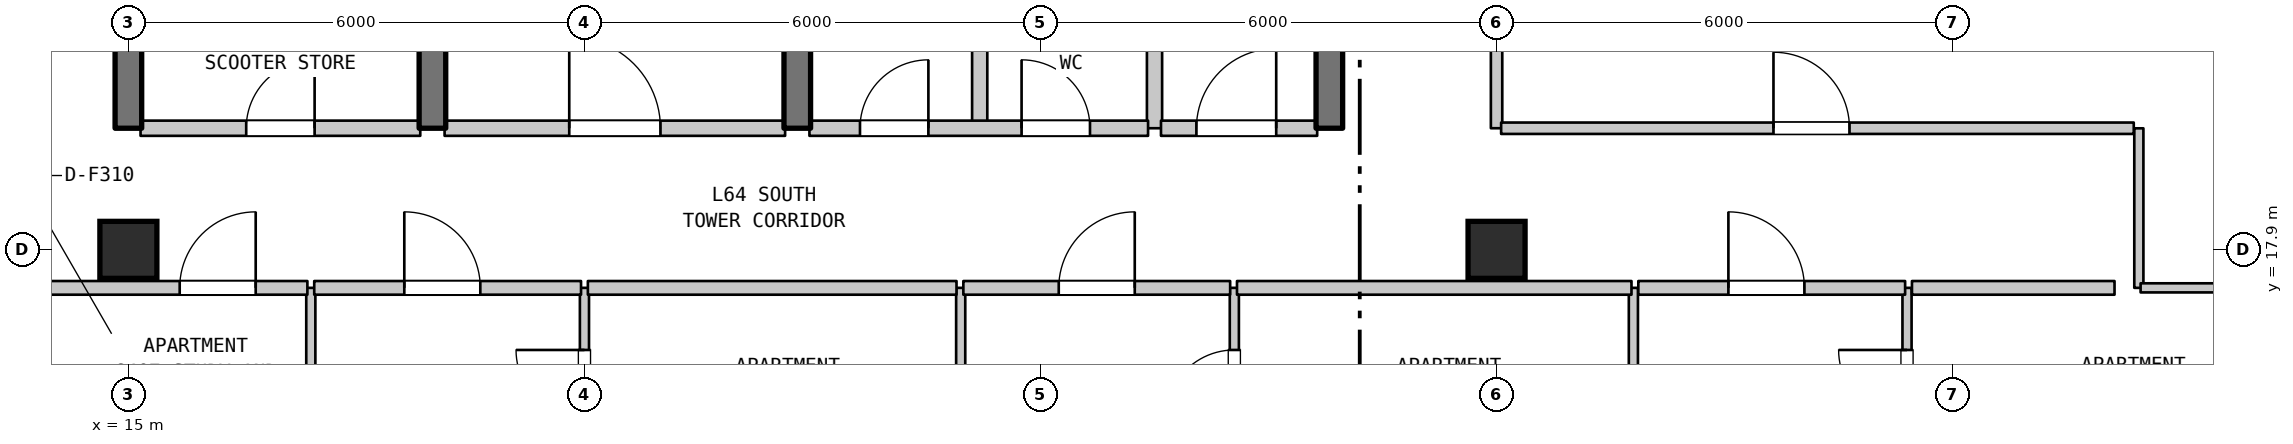
"""IFC4 building model, lengths in metres.
Left out: names, types, materials, properties, quantities, classifications, styles, units other than length and angle.
Written with IfcOpenShell. Run it as: python <this file> out.ifc"""

import sys

from ifc_helpers import new_model, si_unit, direction, frame, frame_2d, origin, origin_2d, place, context, subcontext, project, spatial, rectangle, extrude, element, fill, save


model = new_model("IFC4")
c1 = context("Model", 3, precision=1e-05, world=origin(), true_north=direction((0.0, 1.0)))
c2 = subcontext(c1, "Body", "Model", "MODEL_VIEW")
j1 = project(units=[si_unit("LENGTHUNIT", "METRE"), si_unit("PLANEANGLEUNIT", "RADIAN")], contexts=[c1])
p1 = place(None, origin())
s1 = spatial("IfcSite", under=j1, at=p1, CompositionType="ELEMENT")
p2 = place(p1, origin())
s2 = spatial("IfcBuilding", under=s1, at=p2, CompositionType="ELEMENT")
p3 = place(p2, frame((0.0, 0.0, 258.4)))
s3 = spatial("IfcBuildingStorey", under=s2, at=p3, CompositionType="ELEMENT", Elevation=258.4)
for number, where, z_axis, x_axis in (
    (1, (15.0, 17.9, 0.0), (0.0, 0.0, 1.0), (1.0, 0.0, 0.0)),
    (2, (33.0, 17.9, 0.0), (0.0, 0.0, 1.0), (1.0, 0.0, 0.0)),
):
    element("IfcColumn", number, at=place(p3, frame(where, z_axis=z_axis, x_axis=x_axis)), inside=s3, PredefinedType="COLUMN", context=c2, shape_type="SweptSolid", body=[
        extrude(rectangle(XDim=0.75, YDim=0.75, at=origin_2d()), origin(), (0.0, 0.0, 1.0), 3.7),
    ])
p4 = place(p3, frame((15.0, 19.5, 0.0), z_axis=(0.0, 0.0, 1.0), x_axis=(0.0, 1.0, 0.0)))
e3 = element("IfcWall", 3, at=p4, inside=s3, PredefinedType="SHEAR", context=c2, shape_type="SweptSolid", body=[
    extrude(rectangle(XDim=3.2, YDim=0.35, at=frame_2d((1.6, 0.0))), origin(), (0.0, 0.0, 1.0), 3.39),
])
p5 = place(p3, frame((17.4, 9.91, 0.0), z_axis=(0.0, 0.0, 1.0), x_axis=(0.0, 1.0, 0.0)))
e4 = element("IfcWall", 4, at=p5, inside=s3, PredefinedType="PARTITIONING", context=c2, shape_type="SweptSolid", body=[
    extrude(rectangle(XDim=7.49, YDim=0.12, at=frame_2d((3.745, 0.0))), origin(), (0.0, 0.0, 1.0), 3.39),
])
p6 = place(p3, frame((19.0, 19.5, 0.0), z_axis=(0.0, 0.0, 1.0), x_axis=(0.0, 1.0, 0.0)))
e5 = element("IfcWall", 5, at=p6, inside=s3, PredefinedType="SHEAR", context=c2, shape_type="SweptSolid", body=[
    extrude(rectangle(XDim=3.2, YDim=0.35, at=frame_2d((1.6, 0.0))), origin(), (0.0, 0.0, 1.0), 3.39),
])
p7 = place(p3, frame((21.0, 15.008, 0.0), z_axis=(0.0, 0.0, 1.0), x_axis=(0.0, 1.0, 0.0)))
e6 = element("IfcWall", 6, at=p7, inside=s3, PredefinedType="PARTITIONING", context=c2, shape_type="SweptSolid", body=[
    extrude(rectangle(XDim=2.392, YDim=0.12, at=frame_2d((1.196, 0.0))), origin(), (0.0, 0.0, 1.0), 3.39),
])
p8 = place(p7, frame((0.675, 0.0, 0.0)))
e7 = element("IfcOpeningElement", 7, at=p8, cuts=e6, PredefinedType="OPENING", context=c2, shape_type="SweptSolid", body=[
    extrude(rectangle(XDim=0.9, YDim=2.1, at=frame_2d((0.45, 1.05))), frame((0.0, 0.07, 0.0), z_axis=(0.0, -1.0, 0.0), x_axis=(1.0, 0.0, 0.0)), (0.0, 0.0, 1.0), 0.14),
])
p9 = place(p3, frame((23.8, 19.5, 0.0), z_axis=(0.0, 0.0, 1.0), x_axis=(0.0, 1.0, 0.0)))
e8 = element("IfcWall", 8, at=p9, inside=s3, PredefinedType="SHEAR", context=c2, shape_type="SweptSolid", body=[
    extrude(rectangle(XDim=3.2, YDim=0.35, at=frame_2d((1.6, 0.0))), origin(), (0.0, 0.0, 1.0), 3.39),
])
p10 = place(p3, frame((25.95, 15.008, 0.0), z_axis=(0.0, 0.0, 1.0), x_axis=(0.0, 1.0, 0.0)))
e9 = element("IfcWall", 9, at=p10, inside=s3, PredefinedType="PARTITIONING", context=c2, shape_type="SweptSolid", body=[
    extrude(rectangle(XDim=2.392, YDim=0.12, at=frame_2d((1.196, 0.0))), origin(), (0.0, 0.0, 1.0), 3.39),
])
for number, where, z_axis, x_axis in (
    (10, (26.2, 19.5, 0.0), (0.0, 0.0, 1.0), (0.0, 1.0, 0.0)),
    (11, (28.5, 19.5, 0.0), (0.0, 0.0, 1.0), (0.0, 1.0, 0.0)),
):
    element("IfcWall", number, at=place(p3, frame(where, z_axis=z_axis, x_axis=x_axis)), inside=s3, PredefinedType="STANDARD", context=c2, shape_type="SweptSolid", body=[
        extrude(rectangle(XDim=3.2, YDim=0.2, at=frame_2d((1.6, 0.0))), origin(), (0.0, 0.0, 1.0), 3.39),
    ])
p11 = place(p3, frame((29.55, 15.008, 0.0), z_axis=(0.0, 0.0, 1.0), x_axis=(0.0, 1.0, 0.0)))
e12 = element("IfcWall", 12, at=p11, inside=s3, PredefinedType="PARTITIONING", context=c2, shape_type="SweptSolid", body=[
    extrude(rectangle(XDim=2.392, YDim=0.12, at=frame_2d((1.196, 0.0))), origin(), (0.0, 0.0, 1.0), 3.39),
])
p12 = place(p11, frame((0.675, 0.0, 0.0)))
e13 = element("IfcOpeningElement", 13, at=p12, cuts=e12, PredefinedType="OPENING", context=c2, shape_type="SweptSolid", body=[
    extrude(rectangle(XDim=0.9, YDim=2.1, at=frame_2d((0.45, 1.05))), frame((0.0, 0.07, 0.0), z_axis=(0.0, -1.0, 0.0), x_axis=(1.0, 0.0, 0.0)), (0.0, 0.0, 1.0), 0.14),
])
p13 = place(p3, frame((30.8, 19.5, 0.0), z_axis=(0.0, 0.0, 1.0), x_axis=(0.0, 1.0, 0.0)))
e14 = element("IfcWall", 14, at=p13, inside=s3, PredefinedType="SHEAR", context=c2, shape_type="SweptSolid", body=[
    extrude(rectangle(XDim=3.2, YDim=0.35, at=frame_2d((1.6, 0.0))), origin(), (0.0, 0.0, 1.0), 3.39),
])
p14 = place(p3, frame((33.0, 19.5, 0.0), z_axis=(0.0, 0.0, 1.0), x_axis=(0.0, 1.0, 0.0)))
e15 = element("IfcWall", 15, at=p14, inside=s3, PredefinedType="STANDARD", context=c2, shape_type="SweptSolid", body=[
    extrude(rectangle(XDim=8.4, YDim=0.15, at=frame_2d((4.2, 0.0))), origin(), (0.0, 0.0, 1.0), 3.1),
])
p15 = place(p14, frame((4.48, 0.0, 0.0)))
e16 = element("IfcOpeningElement", 16, at=p15, cuts=e15, PredefinedType="OPENING", context=c2, shape_type="SweptSolid", body=[
    extrude(rectangle(XDim=1.0, YDim=2.15, at=frame_2d((0.5, 1.075))), frame((0.0, 0.085, 0.0), z_axis=(0.0, -1.0, 0.0), x_axis=(1.0, 0.0, 0.0)), (0.0, 0.0, 1.0), 0.17),
])
p16 = place(p3, frame((34.8, 15.008, 0.0), z_axis=(0.0, 0.0, 1.0), x_axis=(0.0, 1.0, 0.0)))
e17 = element("IfcWall", 17, at=p16, inside=s3, PredefinedType="PARTITIONING", context=c2, shape_type="SweptSolid", body=[
    extrude(rectangle(XDim=2.392, YDim=0.12, at=frame_2d((1.196, 0.0))), origin(), (0.0, 0.0, 1.0), 3.39),
])
p17 = place(p3, frame((38.4, 15.008, 0.0), z_axis=(0.0, 0.0, 1.0), x_axis=(0.0, 1.0, 0.0)))
e18 = element("IfcWall", 18, at=p17, inside=s3, PredefinedType="PARTITIONING", context=c2, shape_type="SweptSolid", body=[
    extrude(rectangle(XDim=2.392, YDim=0.12, at=frame_2d((1.196, 0.0))), origin(), (0.0, 0.0, 1.0), 3.39),
])
p18 = place(p17, frame((0.675, 0.0, 0.0)))
e19 = element("IfcOpeningElement", 19, at=p18, cuts=e18, PredefinedType="OPENING", context=c2, shape_type="SweptSolid", body=[
    extrude(rectangle(XDim=0.9, YDim=2.1, at=frame_2d((0.45, 1.05))), frame((0.0, 0.07, 0.0), z_axis=(0.0, -1.0, 0.0), x_axis=(1.0, 0.0, 0.0)), (0.0, 0.0, 1.0), 0.14),
])
p19 = place(p3, frame((41.45, 17.4, 0.0), z_axis=(0.0, 0.0, 1.0), x_axis=(0.0, 1.0, 0.0)))
e20 = element("IfcWall", 20, at=p19, inside=s3, PredefinedType="PARTITIONING", context=c2, shape_type="SweptSolid", body=[
    extrude(rectangle(XDim=2.099, YDim=0.12, at=frame_2d((1.05, 0.0))), origin(), (0.0, 0.0, 1.0), 3.39),
])
p20 = place(p3, frame((13.665, 17.4, 0.0), z_axis=(0.0, 0.0, 1.0), x_axis=(1.0, 0.0, 0.0)))
e21 = element("IfcWall", 21, at=p20, inside=s3, PredefinedType="STANDARD", context=c2, shape_type="SweptSolid", body=[
    extrude(rectangle(XDim=3.69, YDim=0.18, at=frame_2d((1.845, 0.0))), origin(), (0.0, 0.0, 1.0), 3.39),
])
p21 = place(p20, frame((2.01, 0.0, 0.0)))
e22 = element("IfcOpeningElement", 22, at=p21, cuts=e21, PredefinedType="OPENING", context=c2, shape_type="SweptSolid", body=[
    extrude(rectangle(XDim=1.0, YDim=2.15, at=frame_2d((0.5, 1.075))), frame((0.0, 0.1, 0.0), z_axis=(0.0, -1.0, 0.0), x_axis=(1.0, 0.0, 0.0)), (0.0, 0.0, 1.0), 0.2),
])
p22 = place(p3, frame((17.445, 17.4, 0.0), z_axis=(0.0, 0.0, 1.0), x_axis=(1.0, 0.0, 0.0)))
e23 = element("IfcWall", 23, at=p22, inside=s3, PredefinedType="STANDARD", context=c2, shape_type="SweptSolid", body=[
    extrude(rectangle(XDim=3.51, YDim=0.18, at=frame_2d((1.755, 0.0))), origin(), (0.0, 0.0, 1.0), 3.39),
])
p23 = place(p22, frame((1.185, 0.0, 0.0)))
e24 = element("IfcOpeningElement", 24, at=p23, cuts=e23, PredefinedType="OPENING", context=c2, shape_type="SweptSolid", body=[
    extrude(rectangle(XDim=1.0, YDim=2.15, at=frame_2d((0.5, 1.075))), frame((0.0, 0.1, 0.0), z_axis=(0.0, -1.0, 0.0), x_axis=(1.0, 0.0, 0.0)), (0.0, 0.0, 1.0), 0.2),
])
p24 = place(p3, frame((21.045, 17.4, 0.0), z_axis=(0.0, 0.0, 1.0), x_axis=(1.0, 0.0, 0.0)))
e25 = element("IfcWall", 25, at=p24, inside=s3, PredefinedType="STANDARD", context=c2, shape_type="SweptSolid", body=[
    extrude(rectangle(XDim=4.85, YDim=0.18, at=frame_2d((2.425, 0.0))), origin(), (0.0, 0.0, 1.0), 3.39),
])
p25 = place(p3, frame((25.985, 17.4, 0.0), z_axis=(0.0, 0.0, 1.0), x_axis=(1.0, 0.0, 0.0)))
e26 = element("IfcWall", 26, at=p25, inside=s3, PredefinedType="STANDARD", context=c2, shape_type="SweptSolid", body=[
    extrude(rectangle(XDim=3.51, YDim=0.18, at=frame_2d((1.755, 0.0))), origin(), (0.0, 0.0, 1.0), 3.39),
])
p26 = place(p25, frame((1.255, 0.0, 0.0)))
e27 = element("IfcOpeningElement", 27, at=p26, cuts=e26, PredefinedType="OPENING", context=c2, shape_type="SweptSolid", body=[
    extrude(rectangle(XDim=1.0, YDim=2.15, at=frame_2d((0.5, 1.075))), frame((0.0, 0.1, 0.0), z_axis=(0.0, -1.0, 0.0), x_axis=(1.0, 0.0, 0.0)), (0.0, 0.0, 1.0), 0.2),
])
p27 = place(p3, frame((29.585, 17.4, 0.0), z_axis=(0.0, 0.0, 1.0), x_axis=(1.0, 0.0, 0.0)))
e28 = element("IfcWall", 28, at=p27, inside=s3, PredefinedType="STANDARD", context=c2, shape_type="SweptSolid", body=[
    extrude(rectangle(XDim=5.19, YDim=0.18, at=frame_2d((2.595, 0.0))), origin(), (0.0, 0.0, 1.0), 3.39),
])
p28 = place(p3, frame((34.865, 17.4, 0.0), z_axis=(0.0, 0.0, 1.0), x_axis=(1.0, 0.0, 0.0)))
e29 = element("IfcWall", 29, at=p28, inside=s3, PredefinedType="STANDARD", context=c2, shape_type="SweptSolid", body=[
    extrude(rectangle(XDim=3.51, YDim=0.18, at=frame_2d((1.755, 0.0))), origin(), (0.0, 0.0, 1.0), 3.39),
])
p29 = place(p28, frame((1.185, 0.0, 0.0)))
e30 = element("IfcOpeningElement", 30, at=p29, cuts=e29, PredefinedType="OPENING", context=c2, shape_type="SweptSolid", body=[
    extrude(rectangle(XDim=1.0, YDim=2.15, at=frame_2d((0.5, 1.075))), frame((0.0, 0.1, 0.0), z_axis=(0.0, -1.0, 0.0), x_axis=(1.0, 0.0, 0.0)), (0.0, 0.0, 1.0), 0.2),
])
p30 = place(p3, frame((38.465, 17.4, 0.0), z_axis=(0.0, 0.0, 1.0), x_axis=(1.0, 0.0, 0.0)))
e31 = element("IfcWall", 31, at=p30, inside=s3, PredefinedType="STANDARD", context=c2, shape_type="SweptSolid", body=[
    extrude(rectangle(XDim=2.665, YDim=0.18, at=frame_2d((1.333, 0.0))), origin(), (0.0, 0.0, 1.0), 3.39),
])
p31 = place(p3, frame((41.473, 17.4, 0.0), z_axis=(0.0, 0.0, 1.0), x_axis=(1.0, 0.0, 0.0)))
e32 = element("IfcWall", 32, at=p31, inside=s3, PredefinedType="PARTITIONING", context=c2, shape_type="SweptSolid", body=[
    extrude(rectangle(XDim=2.031, YDim=0.12, at=frame_2d((1.016, 0.0))), origin(), (0.0, 0.0, 1.0), 3.39),
])
p32 = place(p3, frame((15.16, 19.5, 0.0), z_axis=(0.0, 0.0, 1.0), x_axis=(1.0, 0.0, 0.0)))
e33 = element("IfcWall", 33, at=p32, inside=s3, PredefinedType="STANDARD", context=c2, shape_type="SweptSolid", body=[
    extrude(rectangle(XDim=3.68, YDim=0.2, at=frame_2d((1.84, 0.0))), origin(), (0.0, 0.0, 1.0), 3.39),
])
p33 = place(p32, frame((1.39, 0.0, 0.0)))
e34 = element("IfcOpeningElement", 34, at=p33, cuts=e33, PredefinedType="OPENING", context=c2, shape_type="SweptSolid", body=[
    extrude(rectangle(XDim=0.9, YDim=2.15, at=frame_2d((0.45, 1.075))), frame((0.0, 0.11, 0.0), z_axis=(0.0, -1.0, 0.0), x_axis=(1.0, 0.0, 0.0)), (0.0, 0.0, 1.0), 0.22),
])
p34 = place(p3, frame((19.16, 19.5, 0.0), z_axis=(0.0, 0.0, 1.0), x_axis=(1.0, 0.0, 0.0)))
e35 = element("IfcWall", 35, at=p34, inside=s3, PredefinedType="STANDARD", context=c2, shape_type="SweptSolid", body=[
    extrude(rectangle(XDim=4.48, YDim=0.2, at=frame_2d((2.24, 0.0))), origin(), (0.0, 0.0, 1.0), 3.39),
])
p35 = place(p34, frame((1.64, 0.0, 0.0)))
e36 = element("IfcOpeningElement", 36, at=p35, cuts=e35, PredefinedType="OPENING", context=c2, shape_type="SweptSolid", body=[
    extrude(rectangle(XDim=1.2, YDim=2.2, at=frame_2d((0.6, 1.1))), frame((0.0, 0.11, 0.0), z_axis=(0.0, -1.0, 0.0), x_axis=(1.0, 0.0, 0.0)), (0.0, 0.0, 1.0), 0.22),
])
p36 = place(p3, frame((23.96, 19.5, 0.0), z_axis=(0.0, 0.0, 1.0), x_axis=(1.0, 0.0, 0.0)))
e37 = element("IfcWall", 37, at=p36, inside=s3, PredefinedType="STANDARD", context=c2, shape_type="SweptSolid", body=[
    extrude(rectangle(XDim=4.455, YDim=0.2, at=frame_2d((2.228, 0.0))), origin(), (0.0, 0.0, 1.0), 3.39),
])
p37 = place(p36, frame((0.665, 0.0, 0.0)))
e38 = element("IfcOpeningElement", 38, at=p37, cuts=e37, PredefinedType="OPENING", context=c2, shape_type="SweptSolid", body=[
    extrude(rectangle(XDim=0.9, YDim=2.15, at=frame_2d((0.45, 1.075))), frame((0.0, 0.11, 0.0), z_axis=(0.0, -1.0, 0.0), x_axis=(1.0, 0.0, 0.0)), (0.0, 0.0, 1.0), 0.22),
])
p38 = place(p36, frame((2.791, 0.0, 0.0)))
e39 = element("IfcOpeningElement", 39, at=p38, cuts=e37, PredefinedType="OPENING", context=c2, shape_type="SweptSolid", body=[
    extrude(rectangle(XDim=0.9, YDim=2.15, at=frame_2d((0.45, 1.075))), frame((0.0, 0.11, 0.0), z_axis=(0.0, -1.0, 0.0), x_axis=(1.0, 0.0, 0.0)), (0.0, 0.0, 1.0), 0.22),
])
p39 = place(p3, frame((28.585, 19.5, 0.0), z_axis=(0.0, 0.0, 1.0), x_axis=(1.0, 0.0, 0.0)))
e40 = element("IfcWall", 40, at=p39, inside=s3, PredefinedType="STANDARD", context=c2, shape_type="SweptSolid", body=[
    extrude(rectangle(XDim=2.055, YDim=0.2, at=frame_2d((1.027, 0.0))), origin(), (0.0, 0.0, 1.0), 3.39),
])
p40 = place(p39, frame((0.466, 0.0, 0.0)))
e41 = element("IfcOpeningElement", 41, at=p40, cuts=e40, PredefinedType="OPENING", context=c2, shape_type="SweptSolid", body=[
    extrude(rectangle(XDim=1.05, YDim=2.15, at=frame_2d((0.525, 1.075))), frame((0.0, 0.11, 0.0), z_axis=(0.0, -1.0, 0.0), x_axis=(1.0, 0.0, 0.0)), (0.0, 0.0, 1.0), 0.22),
])
p41 = place(p3, frame((33.06, 19.5, 0.0), z_axis=(0.0, 0.0, 1.0), x_axis=(1.0, 0.0, 0.0)))
e42 = element("IfcWall", 42, at=p41, inside=s3, PredefinedType="STANDARD", context=c2, shape_type="SweptSolid", body=[
    extrude(rectangle(XDim=8.323, YDim=0.15, at=frame_2d((4.162, 0.0))), origin(), (0.0, 0.0, 1.0), 3.39),
])
p42 = place(p41, frame((3.583, 0.0, 0.0)))
e43 = element("IfcOpeningElement", 43, at=p42, cuts=e42, PredefinedType="OPENING", context=c2, shape_type="SweptSolid", body=[
    extrude(rectangle(XDim=1.0, YDim=2.15, at=frame_2d((0.5, 1.075))), frame((0.0, 0.085, 0.0), z_axis=(0.0, -1.0, 0.0), x_axis=(1.0, 0.0, 0.0)), (0.0, 0.0, 1.0), 0.17),
])
p43 = place(p8, origin())
e44 = element("IfcDoor", 44, at=p43, inside=s3, OperationType="SINGLE_SWING_RIGHT", PredefinedType="DOOR", context=c2, shape_type="SweptSolid", body=[
    extrude(rectangle(XDim=0.9, YDim=2.1, at=frame_2d((0.45, 1.05))), frame((0.0, 0.025, 0.0), z_axis=(0.0, -1.0, 0.0), x_axis=(1.0, 0.0, 0.0)), (0.0, 0.0, 1.0), 0.05),
])
fill(e7, e44)
p44 = place(p12, origin())
e45 = element("IfcDoor", 45, at=p44, inside=s3, OperationType="SINGLE_SWING_LEFT", PredefinedType="DOOR", context=c2, shape_type="SweptSolid", body=[
    extrude(rectangle(XDim=0.9, YDim=2.1, at=frame_2d((0.45, 1.05))), frame((0.0, 0.025, 0.0), z_axis=(0.0, -1.0, 0.0), x_axis=(1.0, 0.0, 0.0)), (0.0, 0.0, 1.0), 0.05),
])
fill(e13, e45)
p45 = place(p18, origin())
e46 = element("IfcDoor", 46, at=p45, inside=s3, OperationType="SINGLE_SWING_RIGHT", PredefinedType="DOOR", context=c2, shape_type="SweptSolid", body=[
    extrude(rectangle(XDim=0.9, YDim=2.1, at=frame_2d((0.45, 1.05))), frame((0.0, 0.025, 0.0), z_axis=(0.0, -1.0, 0.0), x_axis=(1.0, 0.0, 0.0)), (0.0, 0.0, 1.0), 0.05),
])
fill(e19, e46)
p46 = place(p21, origin())
e47 = element("IfcDoor", 47, at=p46, inside=s3, OperationType="SINGLE_SWING_RIGHT", PredefinedType="DOOR", context=c2, shape_type="SweptSolid", body=[
    extrude(rectangle(XDim=1.0, YDim=2.15, at=frame_2d((0.5, 1.075))), frame((0.0, 0.025, 0.0), z_axis=(0.0, -1.0, 0.0), x_axis=(1.0, 0.0, 0.0)), (0.0, 0.0, 1.0), 0.05),
])
fill(e22, e47)
p47 = place(p23, origin())
e48 = element("IfcDoor", 48, at=p47, inside=s3, OperationType="SINGLE_SWING_LEFT", PredefinedType="DOOR", context=c2, shape_type="SweptSolid", body=[
    extrude(rectangle(XDim=1.0, YDim=2.15, at=frame_2d((0.5, 1.075))), frame((0.0, 0.025, 0.0), z_axis=(0.0, -1.0, 0.0), x_axis=(1.0, 0.0, 0.0)), (0.0, 0.0, 1.0), 0.05),
])
fill(e24, e48)
p48 = place(p26, origin())
e49 = element("IfcDoor", 49, at=p48, inside=s3, OperationType="SINGLE_SWING_RIGHT", PredefinedType="DOOR", context=c2, shape_type="SweptSolid", body=[
    extrude(rectangle(XDim=1.0, YDim=2.15, at=frame_2d((0.5, 1.075))), frame((0.0, 0.025, 0.0), z_axis=(0.0, -1.0, 0.0), x_axis=(1.0, 0.0, 0.0)), (0.0, 0.0, 1.0), 0.05),
])
fill(e27, e49)
p49 = place(p29, origin())
e50 = element("IfcDoor", 50, at=p49, inside=s3, OperationType="SINGLE_SWING_LEFT", PredefinedType="DOOR", context=c2, shape_type="SweptSolid", body=[
    extrude(rectangle(XDim=1.0, YDim=2.15, at=frame_2d((0.5, 1.075))), frame((0.0, 0.025, 0.0), z_axis=(0.0, -1.0, 0.0), x_axis=(1.0, 0.0, 0.0)), (0.0, 0.0, 1.0), 0.05),
])
fill(e30, e50)
p50 = place(p33, origin())
e51 = element("IfcDoor", 51, at=p50, inside=s3, OperationType="SINGLE_SWING_RIGHT", PredefinedType="DOOR", context=c2, shape_type="SweptSolid", body=[
    extrude(rectangle(XDim=0.9, YDim=2.15, at=frame_2d((0.45, 1.075))), frame((0.0, 0.025, 0.0), z_axis=(0.0, -1.0, 0.0), x_axis=(1.0, 0.0, 0.0)), (0.0, 0.0, 1.0), 0.05),
])
fill(e34, e51)
p51 = place(p35, origin())
e52 = element("IfcDoor", 52, at=p51, inside=s3, OperationType="SINGLE_SWING_LEFT", PredefinedType="DOOR", context=c2, shape_type="SweptSolid", body=[
    extrude(rectangle(XDim=1.2, YDim=2.2, at=frame_2d((0.6, 1.1))), frame((0.0, 0.025, 0.0), z_axis=(0.0, -1.0, 0.0), x_axis=(1.0, 0.0, 0.0)), (0.0, 0.0, 1.0), 0.05),
])
fill(e36, e52)
p52 = place(p37, origin())
e53 = element("IfcDoor", 53, at=p52, inside=s3, OperationType="SINGLE_SWING_RIGHT", PredefinedType="DOOR", context=c2, shape_type="SweptSolid", body=[
    extrude(rectangle(XDim=0.9, YDim=2.15, at=frame_2d((0.45, 1.075))), frame((0.0, 0.025, 0.0), z_axis=(0.0, -1.0, 0.0), x_axis=(1.0, 0.0, 0.0)), (0.0, 0.0, 1.0), 0.05),
])
fill(e38, e53)
p53 = place(p38, origin())
e54 = element("IfcDoor", 54, at=p53, inside=s3, OperationType="SINGLE_SWING_LEFT", PredefinedType="DOOR", context=c2, shape_type="SweptSolid", body=[
    extrude(rectangle(XDim=0.9, YDim=2.15, at=frame_2d((0.45, 1.075))), frame((0.0, 0.025, 0.0), z_axis=(0.0, -1.0, 0.0), x_axis=(1.0, 0.0, 0.0)), (0.0, 0.0, 1.0), 0.05),
])
fill(e39, e54)
p54 = place(p40, origin())
e55 = element("IfcDoor", 55, at=p54, inside=s3, OperationType="SINGLE_SWING_RIGHT", PredefinedType="DOOR", context=c2, shape_type="SweptSolid", body=[
    extrude(rectangle(XDim=1.05, YDim=2.15, at=frame_2d((0.525, 1.075))), frame((0.0, 0.025, 0.0), z_axis=(0.0, -1.0, 0.0), x_axis=(1.0, 0.0, 0.0)), (0.0, 0.0, 1.0), 0.05),
])
fill(e41, e55)
p55 = place(p42, origin())
e56 = element("IfcDoor", 56, at=p55, inside=s3, OperationType="SINGLE_SWING_LEFT", PredefinedType="DOOR", context=c2, shape_type="SweptSolid", body=[
    extrude(rectangle(XDim=1.0, YDim=2.15, at=frame_2d((0.5, 1.075))), frame((0.0, 0.025, 0.0), z_axis=(0.0, -1.0, 0.0), x_axis=(1.0, 0.0, 0.0)), (0.0, 0.0, 1.0), 0.05),
])
fill(e43, e56)
save(model, sys.argv[1])
